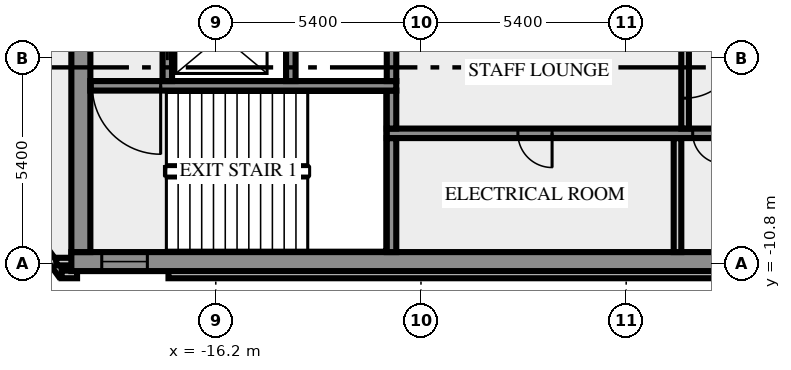
"""IFC4 building model, lengths in metres.
Left out: names, types, materials, properties, quantities, classifications, styles, units other than length and angle.
Written with IfcOpenShell. Run it as: python <this file> out.ifc"""

import sys

from ifc_helpers import new_model, si_unit, direction, frame, frame_2d, origin, place, context, subcontext, project, spatial, rectangle, extrude, element, fill, save


model = new_model("IFC4")
c1 = context("Model", 3, precision=1e-05, world=origin(), true_north=direction((0.0, 1.0)))
c2 = subcontext(c1, "Body", "Model", "MODEL_VIEW")
j1 = project(units=[si_unit("LENGTHUNIT", "METRE"), si_unit("PLANEANGLEUNIT", "RADIAN")], contexts=[c1])
p1 = place(None, origin())
s1 = spatial("IfcSite", under=j1, at=p1, CompositionType="ELEMENT")
p2 = place(p1, origin())
s2 = spatial("IfcBuilding", under=s1, at=p2, CompositionType="ELEMENT")
p3 = place(p2, frame((0.0, 0.0, 238.0)))
s3 = spatial("IfcBuildingStorey", under=s2, at=p3, CompositionType="ELEMENT", Elevation=238.0)
p4 = place(p3, frame((-21.833, -8.909, 0.0), z_axis=(0.0, 0.0, 1.0), x_axis=(0.587766567315, -0.809030569476, 0.0)))
e1 = element("IfcWall", 1, at=p4, inside=s3, PredefinedType="SOLIDWALL", context=c2, shape_type="SweptSolid", body=[
    extrude(rectangle(XDim=2.688, YDim=0.2, at=frame_2d((1.344, 0.0))), origin(), (0.0, 0.0, 1.0), 3.4),
])
p5 = place(p3, frame((-20.256, -11.088, 0.0), z_axis=(0.0, 0.0, 1.0), x_axis=(1.0, 0.0, 0.0)))
e2 = element("IfcWall", 2, at=p5, inside=s3, PredefinedType="SOLIDWALL", context=c2, shape_type="SweptSolid", body=[
    extrude(rectangle(XDim=0.406, YDim=0.2, at=frame_2d((0.203, 0.0))), origin(), (0.0, 0.0, 1.0), 3.4),
])
p6 = place(p3, frame((-17.444, -11.088, 0.0), z_axis=(0.0, 0.0, 1.0), x_axis=(1.0, 0.0, 0.0)))
e3 = element("IfcWall", 3, at=p6, inside=s3, PredefinedType="SOLIDWALL", context=c2, shape_type="SweptSolid", body=[
    extrude(rectangle(XDim=34.888, YDim=0.2, at=frame_2d((17.444, 0.0))), origin(), (0.0, 0.0, 1.0), 3.4),
])
p7 = place(p3, frame((-19.98, -10.75, 0.0), z_axis=(0.0, 0.0, 1.0), x_axis=(-1.0, 0.0, 0.0)))
e4 = element("IfcWall", 4, at=p7, inside=s3, PredefinedType="SOLIDWALL", context=c2, shape_type="SweptSolid", body=[
    extrude(rectangle(XDim=0.417, YDim=0.2, at=frame_2d((0.208, 0.0))), origin(), (0.0, 0.0, 1.0), 3.4),
])
p8 = place(p3, frame((-20.0, -10.75, 0.0), z_axis=(0.0, 0.0, 1.0), x_axis=(1.0, 0.0, 0.0)))
e5 = element("IfcWall", 5, at=p8, inside=s3, PredefinedType="SHEAR", context=c2, shape_type="SweptSolid", body=[
    extrude(rectangle(XDim=40.0, YDim=0.5, at=frame_2d((20.0, 0.0))), origin(), (0.0, 0.0, 1.0), 3.4),
])
p9 = place(p8, frame((0.8, 0.0, 1.0)))
e6 = element("IfcOpeningElement", 6, at=p9, cuts=e5, PredefinedType="OPENING", context=c2, shape_type="SweptSolid", body=[
    extrude(rectangle(XDim=1.2, YDim=1.2, at=frame_2d((0.6, 0.6))), frame((0.0, 0.26, 0.0), z_axis=(0.0, -1.0, 0.0), x_axis=(1.0, 0.0, 0.0)), (0.0, 0.0, 1.0), 0.52),
])
p10 = place(p8, frame((38.0, 0.0, 1.0)))
e7 = element("IfcOpeningElement", 7, at=p10, cuts=e5, PredefinedType="OPENING", context=c2, shape_type="SweptSolid", body=[
    extrude(rectangle(XDim=1.2, YDim=1.2, at=frame_2d((0.6, 0.6))), frame((0.0, 0.26, 0.0), z_axis=(0.0, -1.0, 0.0), x_axis=(1.0, 0.0, 0.0)), (0.0, 0.0, 1.0), 0.52),
])
p11 = place(p3, frame((-19.75, -10.5, 0.0), z_axis=(0.0, 0.0, 1.0), x_axis=(0.0, 1.0, 0.0)))
e8 = element("IfcWall", 8, at=p11, inside=s3, PredefinedType="SHEAR", context=c2, shape_type="SweptSolid", body=[
    extrude(rectangle(XDim=8.8, YDim=0.5, at=frame_2d((4.4, 0.0))), origin(), (0.0, 0.0, 1.0), 3.4),
])
p12 = place(p3, frame((-11.575, -10.5, 0.0), z_axis=(0.0, 0.0, 1.0), x_axis=(0.0, 1.0, 0.0)))
e9 = element("IfcWall", 9, at=p12, inside=s3, PredefinedType="SHEAR", context=c2, shape_type="SweptSolid", body=[
    extrude(rectangle(XDim=3.0, YDim=0.25, at=frame_2d((1.5, 0.0))), origin(), (0.0, 0.0, 1.0), 3.4),
])
p13 = place(p3, frame((-4.05, -10.5, 0.0), z_axis=(0.0, 0.0, 1.0), x_axis=(0.0, 1.0, 0.0)))
e10 = element("IfcWall", 10, at=p13, inside=s3, PredefinedType="SOLIDWALL", context=c2, shape_type="SweptSolid", body=[
    extrude(rectangle(XDim=3.0, YDim=0.2, at=frame_2d((1.5, 0.0))), origin(), (0.0, 0.0, 1.0), 3.4),
])
p14 = place(p3, frame((11.7, -7.375, 0.0), z_axis=(0.0, 0.0, 1.0), x_axis=(-1.0, 0.0, 0.0)))
e11 = element("IfcWall", 11, at=p14, inside=s3, PredefinedType="SHEAR", context=c2, shape_type="SweptSolid", body=[
    extrude(rectangle(XDim=23.4, YDim=0.25, at=frame_2d((11.7, 0.0))), origin(), (0.0, 0.0, 1.0), 3.4),
])
p15 = place(p14, frame((19.05, 0.0, 0.0)))
e12 = element("IfcOpeningElement", 12, at=p15, cuts=e11, PredefinedType="OPENING", context=c2, shape_type="SweptSolid", body=[
    extrude(rectangle(XDim=0.9, YDim=2.1, at=frame_2d((0.45, 1.05))), frame((0.0, 0.135, 0.0), z_axis=(0.0, -1.0, 0.0), x_axis=(1.0, 0.0, 0.0)), (0.0, 0.0, 1.0), 0.27),
])
p16 = place(p14, frame((14.55, 0.0, 0.0)))
e13 = element("IfcOpeningElement", 13, at=p16, cuts=e11, PredefinedType="OPENING", context=c2, shape_type="SweptSolid", body=[
    extrude(rectangle(XDim=0.8, YDim=2.1, at=frame_2d((0.4, 1.05))), frame((0.0, 0.135, 0.0), z_axis=(0.0, -1.0, 0.0), x_axis=(1.0, 0.0, 0.0)), (0.0, 0.0, 1.0), 0.27),
])
p17 = place(p14, frame((12.8, 0.0, 0.0)))
e14 = element("IfcOpeningElement", 14, at=p17, cuts=e11, PredefinedType="OPENING", context=c2, shape_type="SweptSolid", body=[
    extrude(rectangle(XDim=0.9, YDim=2.1, at=frame_2d((0.45, 1.05))), frame((0.0, 0.135, 0.0), z_axis=(0.0, -1.0, 0.0), x_axis=(1.0, 0.0, 0.0)), (0.0, 0.0, 1.0), 0.27),
])
p18 = place(p14, frame((10.7, 0.0, 0.0)))
e15 = element("IfcOpeningElement", 15, at=p18, cuts=e11, PredefinedType="OPENING", context=c2, shape_type="SweptSolid", body=[
    extrude(rectangle(XDim=0.9, YDim=2.1, at=frame_2d((0.45, 1.05))), frame((0.0, 0.135, 0.0), z_axis=(0.0, -1.0, 0.0), x_axis=(1.0, 0.0, 0.0)), (0.0, 0.0, 1.0), 0.27),
])
p19 = place(p14, frame((8.35, 0.0, 0.0)))
e16 = element("IfcOpeningElement", 16, at=p19, cuts=e11, PredefinedType="OPENING", context=c2, shape_type="SweptSolid", body=[
    extrude(rectangle(XDim=1.1, YDim=2.1, at=frame_2d((0.55, 1.05))), frame((0.0, 0.135, 0.0), z_axis=(0.0, -1.0, 0.0), x_axis=(1.0, 0.0, 0.0)), (0.0, 0.0, 1.0), 0.27),
])
p20 = place(p14, frame((5.85, 0.0, 0.0)))
e17 = element("IfcOpeningElement", 17, at=p20, cuts=e11, PredefinedType="OPENING", context=c2, shape_type="SweptSolid", body=[
    extrude(rectangle(XDim=1.1, YDim=2.1, at=frame_2d((0.55, 1.05))), frame((0.0, 0.135, 0.0), z_axis=(0.0, -1.0, 0.0), x_axis=(1.0, 0.0, 0.0)), (0.0, 0.0, 1.0), 0.27),
])
p21 = place(p14, frame((3.35, 0.0, 0.0)))
e18 = element("IfcOpeningElement", 18, at=p21, cuts=e11, PredefinedType="OPENING", context=c2, shape_type="SweptSolid", body=[
    extrude(rectangle(XDim=1.1, YDim=2.1, at=frame_2d((0.55, 1.05))), frame((0.0, 0.135, 0.0), z_axis=(0.0, -1.0, 0.0), x_axis=(1.0, 0.0, 0.0)), (0.0, 0.0, 1.0), 0.27),
])
p22 = place(p14, frame((0.85, 0.0, 0.0)))
e19 = element("IfcOpeningElement", 19, at=p22, cuts=e11, PredefinedType="OPENING", context=c2, shape_type="SweptSolid", body=[
    extrude(rectangle(XDim=1.1, YDim=2.1, at=frame_2d((0.55, 1.05))), frame((0.0, 0.135, 0.0), z_axis=(0.0, -1.0, 0.0), x_axis=(1.0, 0.0, 0.0)), (0.0, 0.0, 1.0), 0.27),
])
p23 = place(p3, frame((-11.575, -7.25, 0.0), z_axis=(0.0, 0.0, 1.0), x_axis=(0.0, 1.0, 0.0)))
e20 = element("IfcWall", 20, at=p23, inside=s3, PredefinedType="SHEAR", context=c2, shape_type="SweptSolid", body=[
    extrude(rectangle(XDim=1.0, YDim=0.25, at=frame_2d((0.5, 0.0))), origin(), (0.0, 0.0, 1.0), 3.4),
])
p24 = place(p3, frame((-3.85, -4.25, 0.0), z_axis=(0.0, 0.0, 1.0), x_axis=(0.0, -1.0, 0.0)))
e21 = element("IfcWall", 21, at=p24, inside=s3, PredefinedType="SOLIDWALL", context=c2, shape_type="SweptSolid", body=[
    extrude(rectangle(XDim=3.0, YDim=0.2, at=frame_2d((1.5, 0.0))), origin(), (0.0, 0.0, 1.0), 3.4),
])
p25 = place(p24, frame((0.8, 0.0, 0.0)))
e22 = element("IfcOpeningElement", 22, at=p25, cuts=e21, PredefinedType="OPENING", context=c2, shape_type="SweptSolid", body=[
    extrude(rectangle(XDim=1.4, YDim=2.1, at=frame_2d((0.7, 1.05))), frame((0.0, 0.11, 0.0), z_axis=(0.0, -1.0, 0.0), x_axis=(1.0, 0.0, 0.0)), (0.0, 0.0, 1.0), 0.22),
])
p26 = place(p3, frame((-11.45, -6.125, 0.0), z_axis=(0.0, 0.0, 1.0), x_axis=(-1.0, 0.0, 0.0)))
e23 = element("IfcWall", 23, at=p26, inside=s3, PredefinedType="SHEAR", context=c2, shape_type="SweptSolid", body=[
    extrude(rectangle(XDim=8.05, YDim=0.25, at=frame_2d((4.025, 0.0))), origin(), (0.0, 0.0, 1.0), 3.4),
])
p27 = place(p26, frame((6.2, 0.0, 0.0)))
e24 = element("IfcOpeningElement", 24, at=p27, cuts=e23, PredefinedType="OPENING", context=c2, shape_type="SweptSolid", body=[
    extrude(rectangle(XDim=1.8, YDim=2.1, at=frame_2d((0.9, 1.05))), frame((0.0, 0.135, 0.0), z_axis=(0.0, -1.0, 0.0), x_axis=(1.0, 0.0, 0.0)), (0.0, 0.0, 1.0), 0.27),
])
p28 = place(p3, frame((-17.475, -6.0, 0.0), z_axis=(0.0, 0.0, 1.0), x_axis=(0.0, 1.0, 0.0)))
e25 = element("IfcWall", 25, at=p28, inside=s3, PredefinedType="SHEAR", context=c2, shape_type="SweptSolid", body=[
    extrude(rectangle(XDim=4.3, YDim=0.25, at=frame_2d((2.15, 0.0))), origin(), (0.0, 0.0, 1.0), 3.4),
])
p29 = place(p28, frame((0.55, 0.0, 0.0)))
e26 = element("IfcOpeningElement", 26, at=p29, cuts=e25, PredefinedType="OPENING", context=c2, shape_type="SweptSolid", body=[
    extrude(rectangle(XDim=1.3, YDim=2.1, at=frame_2d((0.65, 1.05))), frame((0.0, 0.135, 0.0), z_axis=(0.0, -1.0, 0.0), x_axis=(1.0, 0.0, 0.0)), (0.0, 0.0, 1.0), 0.27),
])
for number, where, z_axis, x_axis in (
    (27, (-14.225, -6.0, 0.0), (0.0, 0.0, 1.0), (0.0, 1.0, 0.0)),
    (28, (-11.575, -6.0, 0.0), (0.0, 0.0, 1.0), (0.0, 1.0, 0.0)),
):
    element("IfcWall", number, at=place(p3, frame(where, z_axis=z_axis, x_axis=x_axis)), inside=s3, PredefinedType="SHEAR", context=c2, shape_type="SweptSolid", body=[
        extrude(rectangle(XDim=1.75, YDim=0.25, at=frame_2d((0.875, 0.0))), origin(), (0.0, 0.0, 1.0), 3.4),
    ])
p30 = place(p9, origin())
e29 = element("IfcWindow", 29, at=p30, inside=s3, PartitioningType="SINGLE_PANEL", PredefinedType="WINDOW", context=c2, shape_type="SweptSolid", body=[
    extrude(rectangle(XDim=1.2, YDim=1.2, at=frame_2d((0.6, 0.6))), frame((0.0, 0.03, 0.0), z_axis=(0.0, -1.0, 0.0), x_axis=(1.0, 0.0, 0.0)), (0.0, 0.0, 1.0), 0.06),
])
fill(e6, e29)
p31 = place(p15, origin())
e30 = element("IfcDoor", 30, at=p31, inside=s3, OperationType="SINGLE_SWING_RIGHT", PredefinedType="DOOR", context=c2, shape_type="SweptSolid", body=[
    extrude(rectangle(XDim=0.9, YDim=2.1, at=frame_2d((0.45, 1.05))), frame((0.0, 0.025, 0.0), z_axis=(0.0, -1.0, 0.0), x_axis=(1.0, 0.0, 0.0)), (0.0, 0.0, 1.0), 0.05),
])
fill(e12, e30)
p32 = place(p16, origin())
e31 = element("IfcDoor", 31, at=p32, inside=s3, OperationType="SINGLE_SWING_RIGHT", PredefinedType="DOOR", context=c2, shape_type="SweptSolid", body=[
    extrude(rectangle(XDim=0.8, YDim=2.1, at=frame_2d((0.4, 1.05))), frame((0.0, 0.025, 0.0), z_axis=(0.0, -1.0, 0.0), x_axis=(1.0, 0.0, 0.0)), (0.0, 0.0, 1.0), 0.05),
])
fill(e13, e31)
p33 = place(p25, origin())
e32 = element("IfcDoor", 32, at=p33, inside=s3, OperationType="DOUBLE_DOOR_SINGLE_SWING", PredefinedType="DOOR", context=c2, shape_type="SweptSolid", body=[
    extrude(rectangle(XDim=1.4, YDim=2.1, at=frame_2d((0.7, 1.05))), frame((0.0, 0.025, 0.0), z_axis=(0.0, -1.0, 0.0), x_axis=(1.0, 0.0, 0.0)), (0.0, 0.0, 1.0), 0.05),
])
fill(e22, e32)
p34 = place(p27, origin())
e33 = element("IfcDoor", 33, at=p34, inside=s3, OperationType="DOUBLE_DOOR_SINGLE_SWING", PredefinedType="DOOR", context=c2, shape_type="SweptSolid", body=[
    extrude(rectangle(XDim=1.8, YDim=2.1, at=frame_2d((0.9, 1.05))), frame((0.0, 0.025, 0.0), z_axis=(0.0, -1.0, 0.0), x_axis=(1.0, 0.0, 0.0)), (0.0, 0.0, 1.0), 0.05),
])
fill(e24, e33)
p35 = place(p29, origin())
e34 = element("IfcDoor", 34, at=p35, inside=s3, OperationType="DOUBLE_DOOR_SLIDING", PredefinedType="DOOR", context=c2, shape_type="SweptSolid", body=[
    extrude(rectangle(XDim=1.3, YDim=2.1, at=frame_2d((0.65, 1.05))), frame((0.0, 0.025, 0.0), z_axis=(0.0, -1.0, 0.0), x_axis=(1.0, 0.0, 0.0)), (0.0, 0.0, 1.0), 0.05),
])
fill(e26, e34)
save(model, sys.argv[1])
